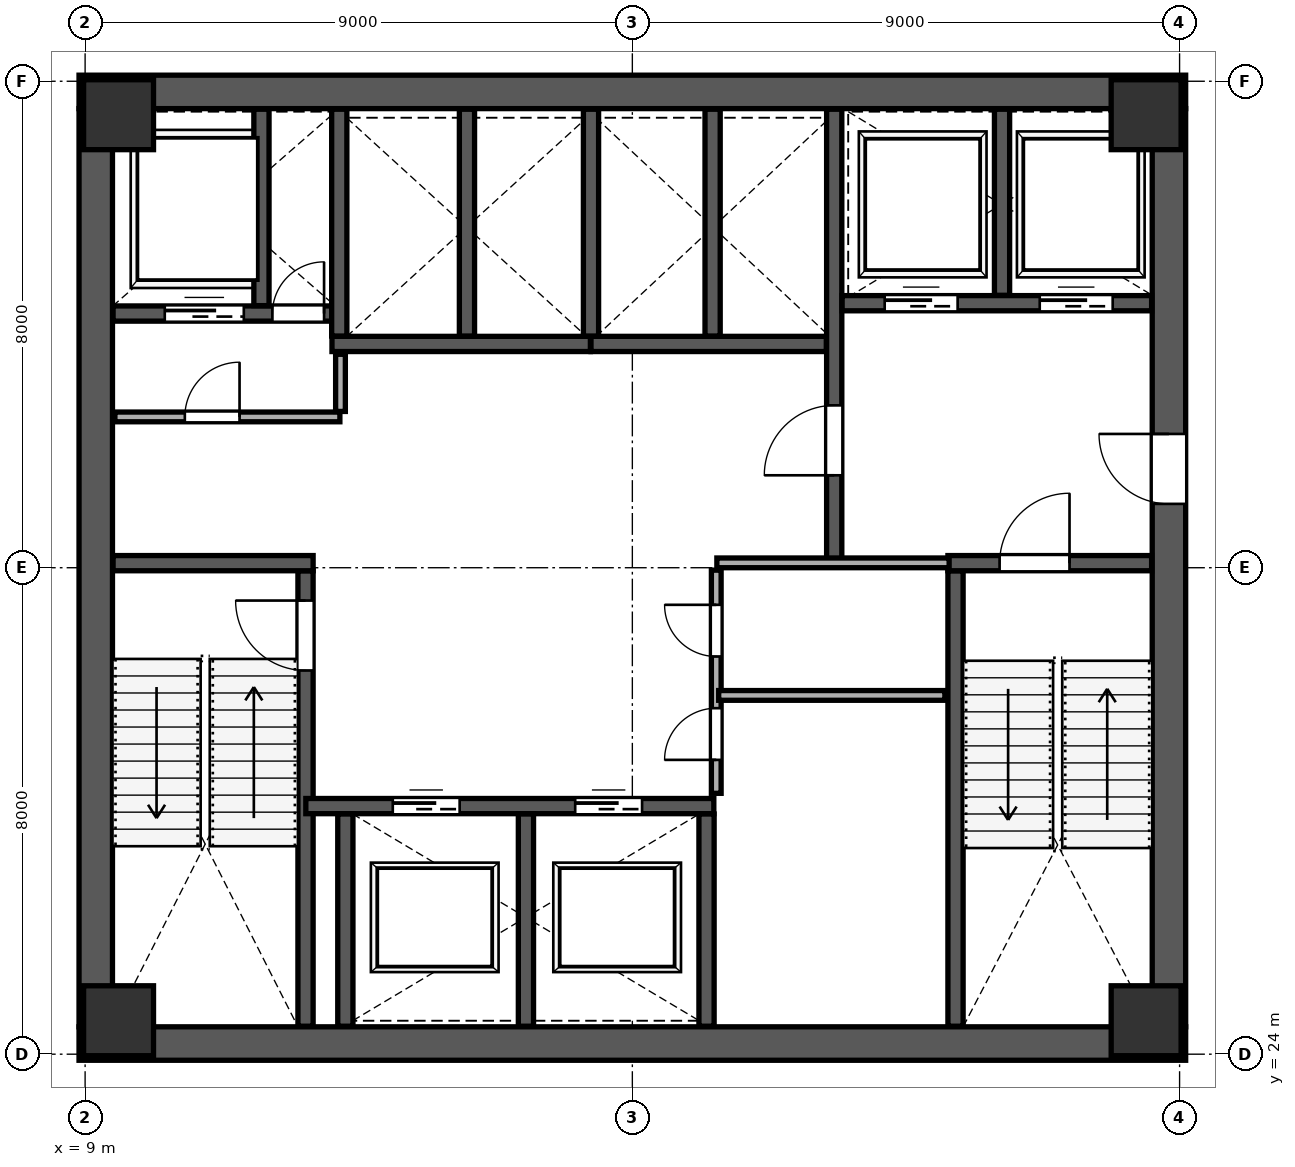
"""IFC4 building model, lengths in metres.
Left out: names, types, materials, properties, quantities, classifications, styles, units other than length and angle.
Written with IfcOpenShell. Run it as: python <this file> out.ifc"""

import sys

from ifc_helpers import new_model, si_unit, direction, frame, frame_2d, origin, origin_2d, place, context, subcontext, project, spatial, rectangle, extrude, source, transform, mapped, element, fill, save


model = new_model("IFC4")
c1 = context("Model", 3, precision=1e-05, world=origin(), true_north=direction((0.0, 1.0)))
c2 = subcontext(c1, "Body", "Model", "MODEL_VIEW")
j1 = project(units=[si_unit("LENGTHUNIT", "METRE"), si_unit("PLANEANGLEUNIT", "RADIAN")], contexts=[c1])
p1 = place(None, origin())
s1 = spatial("IfcSite", under=j1, at=p1, CompositionType="ELEMENT")
p2 = place(p1, origin())
s2 = spatial("IfcBuilding", under=s1, at=p2, CompositionType="ELEMENT")
p3 = place(p2, frame((0.0, 0.0, 79.0)))
s3 = spatial("IfcBuildingStorey", under=s2, at=p3, CompositionType="ELEMENT", Elevation=79.0)
m1 = source(origin(), c2, "Body", "SweptSolid", [
    extrude(rectangle(XDim=1.15, YDim=1.15, at=origin_2d()), origin(), (0.0, 0.0, 1.0), 4.198),
])
for number, where, z_axis, x_axis in (
    (1, (9.55, 24.55, 0.001), (0.0, 0.0, 1.0), (1.0, 0.0, 0.0)),
    (2, (26.45, 24.55, 0.001), (0.0, 0.0, 1.0), (1.0, 0.0, 0.0)),
    (3, (9.55, 39.45, 0.001), (0.0, 0.0, 1.0), (1.0, 0.0, 0.0)),
    (4, (26.45, 39.45, 0.001), (0.0, 0.0, 1.0), (1.0, 0.0, 0.0)),
):
    element("IfcColumn", number, at=place(p3, frame(where, z_axis=z_axis, x_axis=x_axis)), inside=s3, PredefinedType="COLUMN", context=c2, shape_type="MappedRepresentation", body=[
        mapped(m1, transform((0.0, 0.0, 0.0), scale=1.0)),
    ])
p4 = place(p3, frame((9.175, 24.45, 0.0), z_axis=(0.0, 0.0, 1.0), x_axis=(0.0, 1.0, 0.0)))
e5 = element("IfcWall", 5, at=p4, inside=s3, PredefinedType="SHEAR", context=c2, shape_type="SweptSolid", body=[
    extrude(rectangle(XDim=15.1, YDim=0.55, at=frame_2d((7.55, 0.0))), origin(), (0.0, 0.0, 1.0), 3.96),
])
p5 = place(p3, frame((26.825, 24.45, 0.0), z_axis=(0.0, 0.0, 1.0), x_axis=(0.0, 1.0, 0.0)))
e6 = element("IfcWall", 6, at=p5, inside=s3, PredefinedType="SHEAR", context=c2, shape_type="SweptSolid", body=[
    extrude(rectangle(XDim=15.1, YDim=0.55, at=frame_2d((7.55, 0.0))), origin(), (0.0, 0.0, 1.0), 3.96),
])
p6 = place(p5, frame((8.6, 0.0, 0.0)))
e7 = element("IfcOpeningElement", 7, at=p6, cuts=e6, PredefinedType="OPENING", context=c2, shape_type="SweptSolid", body=[
    extrude(rectangle(XDim=1.15, YDim=2.2, at=frame_2d((0.575, 1.1))), frame((0.0, 0.285, 0.0), z_axis=(0.0, -1.0, 0.0), x_axis=(1.0, 0.0, 0.0)), (0.0, 0.0, 1.0), 0.57),
])
for number, where, z_axis, x_axis in (
    (8, (8.9, 24.175, 0.0), (0.0, 0.0, 1.0), (1.0, 0.0, 0.0)),
    (9, (8.9, 39.825, 0.0), (0.0, 0.0, 1.0), (1.0, 0.0, 0.0)),
):
    element("IfcWall", number, at=place(p3, frame(where, z_axis=z_axis, x_axis=x_axis)), inside=s3, PredefinedType="SHEAR", context=c2, shape_type="SweptSolid", body=[
        extrude(rectangle(XDim=18.2, YDim=0.55, at=frame_2d((9.1, 0.0))), origin(), (0.0, 0.0, 1.0), 3.96),
    ])
p7 = place(p3, frame((12.625, 24.46, 0.0), z_axis=(0.0, 0.0, 1.0), x_axis=(0.0, 1.0, 0.0)))
e10 = element("IfcWall", 10, at=p7, inside=s3, PredefinedType="SHEAR", context=c2, shape_type="SweptSolid", body=[
    extrude(rectangle(XDim=7.49, YDim=0.25, at=frame_2d((3.745, 0.0))), origin(), (0.0, 0.0, 1.0), 3.96),
])
p8 = place(p7, frame((5.85, 0.0, 0.0)))
e11 = element("IfcOpeningElement", 11, at=p8, cuts=e10, PredefinedType="OPENING", context=c2, shape_type="SweptSolid", body=[
    extrude(rectangle(XDim=1.15, YDim=2.2, at=frame_2d((0.575, 1.1))), frame((0.0, 0.135, 0.0), z_axis=(0.0, -1.0, 0.0), x_axis=(1.0, 0.0, 0.0)), (0.0, 0.0, 1.0), 0.27),
])
p9 = place(p3, frame((9.46, 32.075, 0.0), z_axis=(0.0, 0.0, 1.0), x_axis=(1.0, 0.0, 0.0)))
e12 = element("IfcWall", 12, at=p9, inside=s3, PredefinedType="SHEAR", context=c2, shape_type="SweptSolid", body=[
    extrude(rectangle(XDim=3.29, YDim=0.25, at=frame_2d((1.645, 0.0))), origin(), (0.0, 0.0, 1.0), 3.96),
])
p10 = place(p3, frame((23.315, 24.46, 0.0), z_axis=(0.0, 0.0, 1.0), x_axis=(0.0, 1.0, 0.0)))
e13 = element("IfcWall", 13, at=p10, inside=s3, PredefinedType="SHEAR", context=c2, shape_type="SweptSolid", body=[
    extrude(rectangle(XDim=7.49, YDim=0.25, at=frame_2d((3.745, 0.0))), origin(), (0.0, 0.0, 1.0), 3.96),
])
p11 = place(p3, frame((23.19, 32.075, 0.0), z_axis=(0.0, 0.0, 1.0), x_axis=(1.0, 0.0, 0.0)))
e14 = element("IfcWall", 14, at=p11, inside=s3, PredefinedType="SHEAR", context=c2, shape_type="SweptSolid", body=[
    extrude(rectangle(XDim=3.35, YDim=0.25, at=frame_2d((1.675, 0.0))), origin(), (0.0, 0.0, 1.0), 3.96),
])
p12 = place(p11, frame((0.85, 0.0, 0.0)))
e15 = element("IfcOpeningElement", 15, at=p12, cuts=e14, PredefinedType="OPENING", context=c2, shape_type="SweptSolid", body=[
    extrude(rectangle(XDim=1.15, YDim=2.2, at=frame_2d((0.575, 1.1))), frame((0.0, 0.135, 0.0), z_axis=(0.0, -1.0, 0.0), x_axis=(1.0, 0.0, 0.0)), (0.0, 0.0, 1.0), 0.27),
])
p13 = place(p3, frame((21.32, 32.12, 0.0), z_axis=(0.0, 0.0, 1.0), x_axis=(0.0, 1.0, 0.0)))
e16 = element("IfcWall", 16, at=p13, inside=s3, PredefinedType="SHEAR", context=c2, shape_type="SweptSolid", body=[
    extrude(rectangle(XDim=7.42, YDim=0.25, at=frame_2d((3.71, 0.0))), origin(), (0.0, 0.0, 1.0), 3.96),
])
p14 = place(p13, frame((1.4, 0.0, 0.0)))
e17 = element("IfcOpeningElement", 17, at=p14, cuts=e16, PredefinedType="OPENING", context=c2, shape_type="SweptSolid", body=[
    extrude(rectangle(XDim=1.15, YDim=2.2, at=frame_2d((0.575, 1.1))), frame((0.0, 0.135, 0.0), z_axis=(0.0, -1.0, 0.0), x_axis=(1.0, 0.0, 0.0)), (0.0, 0.0, 1.0), 0.27),
])
p15 = place(p3, frame((9.46, 36.18, 0.0), z_axis=(0.0, 0.0, 1.0), x_axis=(1.0, 0.0, 0.0)))
e18 = element("IfcWall", 18, at=p15, inside=s3, PredefinedType="SHEAR", context=c2, shape_type="SweptSolid", body=[
    extrude(rectangle(XDim=3.79, YDim=0.25, at=frame_2d((1.895, 0.0))), origin(), (0.0, 0.0, 1.0), 3.96),
])
p16 = place(p15, frame((2.62, 0.0, 0.0)))
e19 = element("IfcOpeningElement", 19, at=p16, cuts=e18, PredefinedType="OPENING", context=c2, shape_type="SweptSolid", body=[
    extrude(rectangle(XDim=0.85, YDim=2.1, at=frame_2d((0.425, 1.05))), frame((0.0, 0.135, 0.0), z_axis=(0.0, -1.0, 0.0), x_axis=(1.0, 0.0, 0.0)), (0.0, 0.0, 1.0), 0.27),
])
p17 = place(p15, frame((0.85, 0.0, 0.0)))
e20 = element("IfcOpeningElement", 20, at=p17, cuts=e18, PredefinedType="OPENING", context=c2, shape_type="SweptSolid", body=[
    extrude(rectangle(XDim=1.3, YDim=2.25, at=frame_2d((0.65, 1.125))), frame((0.0, 0.135, 0.0), z_axis=(0.0, -1.0, 0.0), x_axis=(1.0, 0.0, 0.0)), (0.0, 0.0, 1.0), 0.27),
])
p18 = place(p3, frame((11.9, 36.31, 0.0), z_axis=(0.0, 0.0, 1.0), x_axis=(0.0, 1.0, 0.0)))
e21 = element("IfcWall", 21, at=p18, inside=s3, PredefinedType="SHEAR", context=c2, shape_type="SweptSolid", body=[
    extrude(rectangle(XDim=3.23, YDim=0.25, at=frame_2d((1.615, 0.0))), origin(), (0.0, 0.0, 1.0), 3.96),
])
p19 = place(p3, frame((21.45, 36.35, 0.0), z_axis=(0.0, 0.0, 1.0), x_axis=(1.0, 0.0, 0.0)))
e22 = element("IfcWall", 22, at=p19, inside=s3, PredefinedType="SHEAR", context=c2, shape_type="SweptSolid", body=[
    extrude(rectangle(XDim=5.09, YDim=0.25, at=frame_2d((2.545, 0.0))), origin(), (0.0, 0.0, 1.0), 3.96),
])
p20 = place(p19, frame((0.7, 0.0, 0.0)))
e23 = element("IfcOpeningElement", 23, at=p20, cuts=e22, PredefinedType="OPENING", context=c2, shape_type="SweptSolid", body=[
    extrude(rectangle(XDim=1.2, YDim=2.2, at=frame_2d((0.6, 1.1))), frame((0.0, 0.135, 0.0), z_axis=(0.0, -1.0, 0.0), x_axis=(1.0, 0.0, 0.0)), (0.0, 0.0, 1.0), 0.27),
])
p21 = place(p19, frame((3.25, 0.0, 0.0)))
e24 = element("IfcOpeningElement", 24, at=p21, cuts=e22, PredefinedType="OPENING", context=c2, shape_type="SweptSolid", body=[
    extrude(rectangle(XDim=1.2, YDim=2.2, at=frame_2d((0.6, 1.1))), frame((0.0, 0.135, 0.0), z_axis=(0.0, -1.0, 0.0), x_axis=(1.0, 0.0, 0.0)), (0.0, 0.0, 1.0), 0.27),
])
p22 = place(p3, frame((24.08, 36.48, 0.0), z_axis=(0.0, 0.0, 1.0), x_axis=(0.0, 1.0, 0.0)))
e25 = element("IfcWall", 25, at=p22, inside=s3, PredefinedType="SHEAR", context=c2, shape_type="SweptSolid", body=[
    extrude(rectangle(XDim=3.06, YDim=0.25, at=frame_2d((1.53, 0.0))), origin(), (0.0, 0.0, 1.0), 3.96),
])
p23 = place(p3, frame((12.63, 28.08, 0.0), z_axis=(0.0, 0.0, 1.0), x_axis=(1.0, 0.0, 0.0)))
e26 = element("IfcWall", 26, at=p23, inside=s3, PredefinedType="SHEAR", context=c2, shape_type="SweptSolid", body=[
    extrude(rectangle(XDim=6.71, YDim=0.25, at=frame_2d((3.355, 0.0))), origin(), (0.0, 0.0, 1.0), 3.96),
])
p24 = place(p23, frame((1.43, 0.0, 0.0)))
e27 = element("IfcOpeningElement", 27, at=p24, cuts=e26, PredefinedType="OPENING", context=c2, shape_type="SweptSolid", body=[
    extrude(rectangle(XDim=1.1, YDim=2.2, at=frame_2d((0.55, 1.1))), frame((0.0, 0.135, 0.0), z_axis=(0.0, -1.0, 0.0), x_axis=(1.0, 0.0, 0.0)), (0.0, 0.0, 1.0), 0.27),
])
p25 = place(p23, frame((4.43, 0.0, 0.0)))
e28 = element("IfcOpeningElement", 28, at=p25, cuts=e26, PredefinedType="OPENING", context=c2, shape_type="SweptSolid", body=[
    extrude(rectangle(XDim=1.1, YDim=2.2, at=frame_2d((0.55, 1.1))), frame((0.0, 0.135, 0.0), z_axis=(0.0, -1.0, 0.0), x_axis=(1.0, 0.0, 0.0)), (0.0, 0.0, 1.0), 0.27),
])
for number, where, z_axis, x_axis in (
    (29, (13.28, 24.46, 0.0), (0.0, 0.0, 1.0), (0.0, 1.0, 0.0)),
    (30, (16.25, 24.46, 0.0), (0.0, 0.0, 1.0), (0.0, 1.0, 0.0)),
    (31, (19.22, 24.46, 0.0), (0.0, 0.0, 1.0), (0.0, 1.0, 0.0)),
):
    element("IfcWall", number, at=place(p3, frame(where, z_axis=z_axis, x_axis=x_axis)), inside=s3, PredefinedType="SHEAR", context=c2, shape_type="SweptSolid", body=[
        extrude(rectangle(XDim=3.49, YDim=0.25, at=frame_2d((1.745, 0.0))), origin(), (0.0, 0.0, 1.0), 3.96),
    ])
p26 = place(p3, frame((13.06, 35.68, 0.0), z_axis=(0.0, 0.0, 1.0), x_axis=(1.0, 0.0, 0.0)))
e32 = element("IfcWall", 32, at=p26, inside=s3, PredefinedType="SHEAR", context=c2, shape_type="SweptSolid", body=[
    extrude(rectangle(XDim=4.25, YDim=0.25, at=frame_2d((2.125, 0.0))), origin(), (0.0, 0.0, 1.0), 3.96),
])
for number, where, z_axis, x_axis in (
    (33, (13.18, 35.81, 0.0), (0.0, 0.0, 1.0), (0.0, 1.0, 0.0)),
    (34, (15.28, 35.81, 0.0), (0.0, 0.0, 1.0), (0.0, 1.0, 0.0)),
):
    element("IfcWall", number, at=place(p3, frame(where, z_axis=z_axis, x_axis=x_axis)), inside=s3, PredefinedType="SHEAR", context=c2, shape_type="SweptSolid", body=[
        extrude(rectangle(XDim=3.73, YDim=0.25, at=frame_2d((1.865, 0.0))), origin(), (0.0, 0.0, 1.0), 3.96),
    ])
p27 = place(p3, frame((17.32, 35.68, 0.0), z_axis=(0.0, 0.0, 1.0), x_axis=(1.0, 0.0, 0.0)))
e35 = element("IfcWall", 35, at=p27, inside=s3, PredefinedType="SHEAR", context=c2, shape_type="SweptSolid", body=[
    extrude(rectangle(XDim=3.87, YDim=0.25, at=frame_2d((1.935, 0.0))), origin(), (0.0, 0.0, 1.0), 3.96),
])
for number, where, z_axis, x_axis in (
    (36, (17.32, 35.81, 0.0), (0.0, 0.0, 1.0), (0.0, 1.0, 0.0)),
    (37, (19.32, 35.81, 0.0), (0.0, 0.0, 1.0), (0.0, 1.0, 0.0)),
):
    element("IfcWall", number, at=place(p3, frame(where, z_axis=z_axis, x_axis=x_axis)), inside=s3, PredefinedType="SHEAR", context=c2, shape_type="SweptSolid", body=[
        extrude(rectangle(XDim=3.73, YDim=0.25, at=frame_2d((1.865, 0.0))), origin(), (0.0, 0.0, 1.0), 3.96),
    ])
p28 = place(p3, frame((9.49, 34.48, 0.0), z_axis=(0.0, 0.0, 1.0), x_axis=(1.0, 0.0, 0.0)))
e38 = element("IfcWall", 38, at=p28, inside=s3, PredefinedType="PARTITIONING", context=c2, shape_type="SweptSolid", body=[
    extrude(rectangle(XDim=3.7, YDim=0.16, at=frame_2d((1.85, 0.0))), origin(), (0.0, 0.0, 1.0), 3.96),
])
p29 = place(p28, frame((1.15, 0.0, 0.0)))
e39 = element("IfcOpeningElement", 39, at=p29, cuts=e38, PredefinedType="OPENING", context=c2, shape_type="SweptSolid", body=[
    extrude(rectangle(XDim=0.9, YDim=2.15, at=frame_2d((0.45, 1.075))), frame((0.0, 0.09, 0.0), z_axis=(0.0, -1.0, 0.0), x_axis=(1.0, 0.0, 0.0)), (0.0, 0.0, 1.0), 0.18),
])
p30 = place(p3, frame((13.2, 34.57, 0.0), z_axis=(0.0, 0.0, 1.0), x_axis=(0.0, 1.0, 0.0)))
e40 = element("IfcWall", 40, at=p30, inside=s3, PredefinedType="PARTITIONING", context=c2, shape_type="SweptSolid", body=[
    extrude(rectangle(XDim=0.94, YDim=0.16, at=frame_2d((0.47, 0.0))), origin(), (0.0, 0.0, 1.0), 3.96),
])
p31 = place(p3, frame((19.39, 32.08, 0.0), z_axis=(0.0, 0.0, 1.0), x_axis=(1.0, 0.0, 0.0)))
e41 = element("IfcWall", 41, at=p31, inside=s3, PredefinedType="PARTITIONING", context=c2, shape_type="SweptSolid", body=[
    extrude(rectangle(XDim=3.82, YDim=0.16, at=frame_2d((1.91, 0.0))), origin(), (0.0, 0.0, 1.0), 3.96),
])
p32 = place(p3, frame((19.38, 28.29, 0.0), z_axis=(0.0, 0.0, 1.0), x_axis=(0.0, 1.0, 0.0)))
e42 = element("IfcWall", 42, at=p32, inside=s3, PredefinedType="PARTITIONING", context=c2, shape_type="SweptSolid", body=[
    extrude(rectangle(XDim=3.67, YDim=0.16, at=frame_2d((1.835, 0.0))), origin(), (0.0, 0.0, 1.0), 3.96),
])
p33 = place(p32, frame((0.55, 0.0, 0.0)))
e43 = element("IfcOpeningElement", 43, at=p33, cuts=e42, PredefinedType="OPENING", context=c2, shape_type="SweptSolid", body=[
    extrude(rectangle(XDim=0.85, YDim=2.1, at=frame_2d((0.425, 1.05))), frame((0.0, 0.09, 0.0), z_axis=(0.0, -1.0, 0.0), x_axis=(1.0, 0.0, 0.0)), (0.0, 0.0, 1.0), 0.18),
])
p34 = place(p32, frame((2.25, 0.0, 0.0)))
e44 = element("IfcOpeningElement", 44, at=p34, cuts=e42, PredefinedType="OPENING", context=c2, shape_type="SweptSolid", body=[
    extrude(rectangle(XDim=0.85, YDim=2.1, at=frame_2d((0.425, 1.05))), frame((0.0, 0.09, 0.0), z_axis=(0.0, -1.0, 0.0), x_axis=(1.0, 0.0, 0.0)), (0.0, 0.0, 1.0), 0.18),
])
p35 = place(p3, frame((19.42, 29.9, 0.0), z_axis=(0.0, 0.0, 1.0), x_axis=(1.0, 0.0, 0.0)))
e45 = element("IfcWall", 45, at=p35, inside=s3, PredefinedType="PARTITIONING", context=c2, shape_type="SweptSolid", body=[
    extrude(rectangle(XDim=3.72, YDim=0.16, at=frame_2d((1.86, 0.0))), origin(), (0.0, 0.0, 1.0), 3.96),
])
p36 = place(p3, frame((27.067, 12.72, 0.0), z_axis=(0.0, 0.0, 1.0), x_axis=(0.173654514703, 0.984806635601, 0.0)))
e46 = element("IfcWall", 46, at=p36, inside=s3, PredefinedType="PARTITIONING", context=c2, shape_type="SweptSolid", body=[
    extrude(rectangle(XDim=21.08, YDim=0.16, at=frame_2d((10.54, 0.0))), origin(), (0.0, 0.0, 1.0), 3.96),
])
m2 = source(origin(), c2, "Body", "SweptSolid", [
    extrude(rectangle(XDim=1.15, YDim=2.2, at=frame_2d((0.575, 1.1))), frame((0.0, 0.025, 0.0), z_axis=(0.0, -1.0, 0.0), x_axis=(1.0, 0.0, 0.0)), (0.0, 0.0, 1.0), 0.05),
])
p37 = place(p8, origin())
e47 = element("IfcDoor", 47, at=p37, inside=s3, OperationType="SINGLE_SWING_RIGHT", PredefinedType="DOOR", context=c2, shape_type="MappedRepresentation", body=[
    mapped(m2, transform((0.0, 0.0, 0.0), scale=1.0)),
])
fill(e11, e47)
m3 = source(origin(), c2, "Body", "SweptSolid", [
    extrude(rectangle(XDim=1.15, YDim=2.2, at=frame_2d((0.575, 1.1))), frame((0.0, 0.025, 0.0), z_axis=(0.0, -1.0, 0.0), x_axis=(1.0, 0.0, 0.0)), (0.0, 0.0, 1.0), 0.05),
])
p38 = place(p14, origin())
e48 = element("IfcDoor", 48, at=p38, inside=s3, OperationType="SINGLE_SWING_LEFT", PredefinedType="DOOR", context=c2, shape_type="MappedRepresentation", body=[
    mapped(m3, transform((0.0, 0.0, 0.0), scale=1.0)),
])
fill(e17, e48)
p39 = place(p12, origin())
e49 = element("IfcDoor", 49, at=p39, inside=s3, OperationType="SINGLE_SWING_RIGHT", PredefinedType="DOOR", context=c2, shape_type="MappedRepresentation", body=[
    mapped(m2, transform((0.0, 0.0, 0.0), scale=1.0)),
])
fill(e15, e49)
p40 = place(p6, origin())
e50 = element("IfcDoor", 50, at=p40, inside=s3, OperationType="SINGLE_SWING_RIGHT", PredefinedType="DOOR", context=c2, shape_type="MappedRepresentation", body=[
    mapped(m3, transform((0.0, 0.0, 0.0), scale=1.0)),
])
fill(e7, e50)
m4 = source(origin(), c2, "Body", "SweptSolid", [
    extrude(rectangle(XDim=0.85, YDim=2.1, at=frame_2d((0.425, 1.05))), frame((0.0, 0.025, 0.0), z_axis=(0.0, -1.0, 0.0), x_axis=(1.0, 0.0, 0.0)), (0.0, 0.0, 1.0), 0.05),
])
p41 = place(p16, origin())
e51 = element("IfcDoor", 51, at=p41, inside=s3, OperationType="SINGLE_SWING_RIGHT", PredefinedType="DOOR", context=c2, shape_type="MappedRepresentation", body=[
    mapped(m4, transform((0.0, 0.0, 0.0), scale=1.0)),
])
fill(e19, e51)
m5 = source(origin(), c2, "Body", "SweptSolid", [
    extrude(rectangle(XDim=1.1, YDim=2.2, at=frame_2d((0.55, 1.1))), frame((0.0, 0.025, 0.0), z_axis=(0.0, -1.0, 0.0), x_axis=(1.0, 0.0, 0.0)), (0.0, 0.0, 1.0), 0.05),
])
p42 = place(p24, origin())
e52 = element("IfcDoor", 52, at=p42, inside=s3, OperationType="SLIDING_TO_LEFT", PredefinedType="DOOR", context=c2, shape_type="MappedRepresentation", body=[
    mapped(m5, transform((0.0, 0.0, 0.0), scale=1.0)),
])
fill(e27, e52)
p43 = place(p25, origin())
e53 = element("IfcDoor", 53, at=p43, inside=s3, OperationType="SLIDING_TO_RIGHT", PredefinedType="DOOR", context=c2, shape_type="MappedRepresentation", body=[
    mapped(m5, transform((0.0, 0.0, 0.0), scale=1.0)),
])
fill(e28, e53)
m6 = source(origin(), c2, "Body", "SweptSolid", [
    extrude(rectangle(XDim=1.2, YDim=2.2, at=frame_2d((0.6, 1.1))), frame((0.0, 0.025, 0.0), z_axis=(0.0, -1.0, 0.0), x_axis=(1.0, 0.0, 0.0)), (0.0, 0.0, 1.0), 0.05),
])
p44 = place(p20, origin())
e54 = element("IfcDoor", 54, at=p44, inside=s3, OperationType="SLIDING_TO_LEFT", PredefinedType="DOOR", context=c2, shape_type="MappedRepresentation", body=[
    mapped(m6, transform((0.0, 0.0, 0.0), scale=1.0)),
])
fill(e23, e54)
p45 = place(p21, origin())
e55 = element("IfcDoor", 55, at=p45, inside=s3, OperationType="SLIDING_TO_RIGHT", PredefinedType="DOOR", context=c2, shape_type="MappedRepresentation", body=[
    mapped(m6, transform((0.0, 0.0, 0.0), scale=1.0)),
])
fill(e24, e55)
m7 = source(origin(), c2, "Body", "SweptSolid", [
    extrude(rectangle(XDim=1.3, YDim=2.25, at=frame_2d((0.65, 1.125))), frame((0.0, 0.025, 0.0), z_axis=(0.0, -1.0, 0.0), x_axis=(1.0, 0.0, 0.0)), (0.0, 0.0, 1.0), 0.05),
])
p46 = place(p17, origin())
e56 = element("IfcDoor", 56, at=p46, inside=s3, OperationType="SLIDING_TO_LEFT", PredefinedType="DOOR", context=c2, shape_type="MappedRepresentation", body=[
    mapped(m7, transform((0.0, 0.0, 0.0), scale=1.0)),
])
fill(e20, e56)
m8 = source(origin(), c2, "Body", "SweptSolid", [
    extrude(rectangle(XDim=0.9, YDim=2.15, at=frame_2d((0.45, 1.075))), frame((0.0, 0.025, 0.0), z_axis=(0.0, -1.0, 0.0), x_axis=(1.0, 0.0, 0.0)), (0.0, 0.0, 1.0), 0.05),
])
p47 = place(p29, origin())
e57 = element("IfcDoor", 57, at=p47, inside=s3, OperationType="SINGLE_SWING_RIGHT", PredefinedType="DOOR", context=c2, shape_type="MappedRepresentation", body=[
    mapped(m8, transform((0.0, 0.0, 0.0), scale=1.0)),
])
fill(e39, e57)
p48 = place(p33, origin())
e58 = element("IfcDoor", 58, at=p48, inside=s3, OperationType="SINGLE_SWING_LEFT", PredefinedType="DOOR", context=c2, shape_type="MappedRepresentation", body=[
    mapped(m4, transform((0.0, 0.0, 0.0), scale=1.0)),
])
fill(e43, e58)
p49 = place(p34, origin())
e59 = element("IfcDoor", 59, at=p49, inside=s3, OperationType="SINGLE_SWING_RIGHT", PredefinedType="DOOR", context=c2, shape_type="MappedRepresentation", body=[
    mapped(m4, transform((0.0, 0.0, 0.0), scale=1.0)),
])
fill(e44, e59)
save(model, sys.argv[1])
